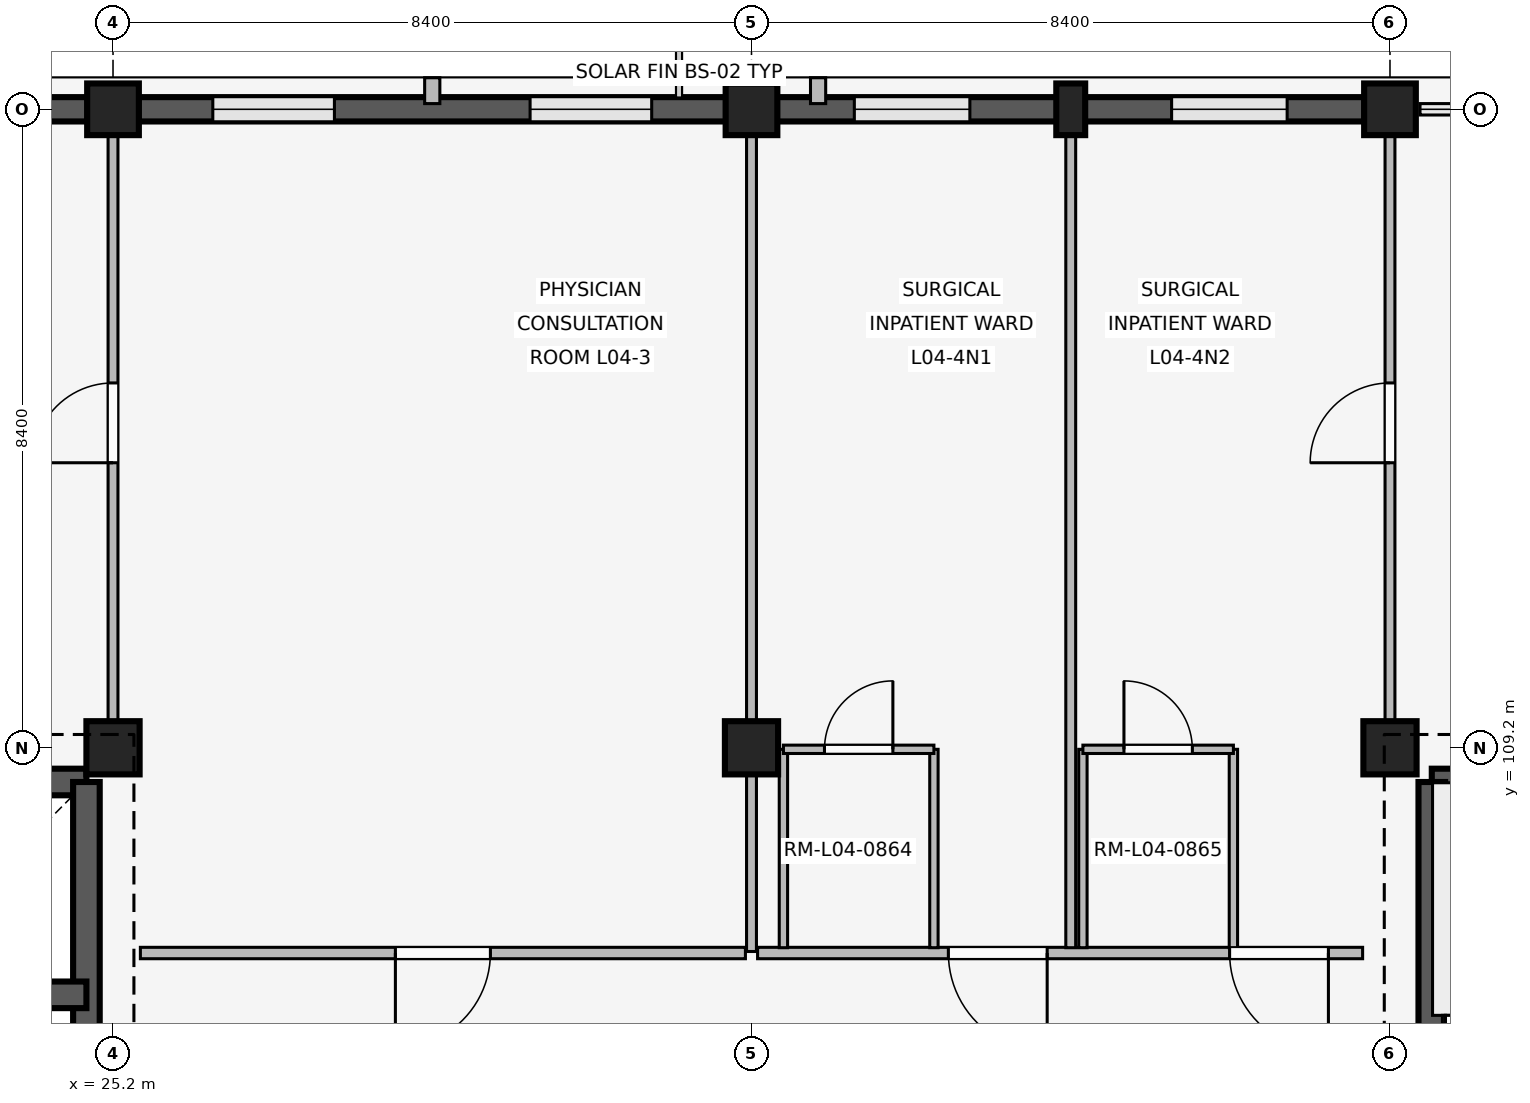
"""IFC4 building model, lengths in metres.
Left out: names, types, materials, properties, quantities, classifications, styles, units other than length and angle.
Written with IfcOpenShell. Run it as: python <this file> out.ifc"""

import sys

from ifc_helpers import new_model, si_unit, direction, frame, frame_2d, origin, origin_2d, place, context, subcontext, project, spatial, rectangle, extrude, element, fill, save


model = new_model("IFC4")
c1 = context("Model", 3, precision=1e-05, world=origin(), true_north=direction((0.0, 1.0)))
c2 = subcontext(c1, "Body", "Model", "MODEL_VIEW")
j1 = project(units=[si_unit("LENGTHUNIT", "METRE"), si_unit("PLANEANGLEUNIT", "RADIAN")], contexts=[c1])
p1 = place(None, origin())
s1 = spatial("IfcSite", under=j1, at=p1, CompositionType="ELEMENT")
p2 = place(p1, origin())
s2 = spatial("IfcBuilding", under=s1, at=p2, CompositionType="ELEMENT")
p3 = place(p2, frame((0.0, 0.0, 16.2)))
s3 = spatial("IfcBuildingStorey", under=s2, at=p3, CompositionType="ELEMENT", Elevation=16.2)
p4 = place(p3, frame((25.2, 109.2, 0.0), z_axis=(0.0, 0.0, 1.0), x_axis=(1.0, 0.0, 0.0)))
e1 = element("IfcColumn", 1, at=p4, inside=s3, PredefinedType="COLUMN", context=c2, shape_type="SweptSolid", body=[
    extrude(rectangle(XDim=0.7, YDim=0.7, at=origin_2d()), origin(), (0.0, 0.0, 1.0), 4.2),
])
p5 = place(p3, frame((25.2, 117.6, 0.0), z_axis=(0.0, 0.0, 1.0), x_axis=(1.0, 0.0, 0.0)))
e2 = element("IfcColumn", 2, at=p5, inside=s3, PredefinedType="COLUMN", context=c2, shape_type="SweptSolid", body=[
    extrude(rectangle(XDim=0.68, YDim=0.68, at=origin_2d()), origin(), (0.0, 0.0, 1.0), 4.2),
])
p6 = place(p3, frame((33.6, 109.2, 0.0), z_axis=(0.0, 0.0, 1.0), x_axis=(1.0, 0.0, 0.0)))
e3 = element("IfcColumn", 3, at=p6, inside=s3, PredefinedType="COLUMN", context=c2, shape_type="SweptSolid", body=[
    extrude(rectangle(XDim=0.7, YDim=0.7, at=origin_2d()), origin(), (0.0, 0.0, 1.0), 4.2),
])
p7 = place(p3, frame((33.6, 117.6, 0.0), z_axis=(0.0, 0.0, 1.0), x_axis=(1.0, 0.0, 0.0)))
e4 = element("IfcColumn", 4, at=p7, inside=s3, PredefinedType="COLUMN", context=c2, shape_type="SweptSolid", body=[
    extrude(rectangle(XDim=0.68, YDim=0.68, at=origin_2d()), origin(), (0.0, 0.0, 1.0), 4.2),
])
p8 = place(p3, frame((42.0, 109.2, 0.0), z_axis=(0.0, 0.0, 1.0), x_axis=(1.0, 0.0, 0.0)))
e5 = element("IfcColumn", 5, at=p8, inside=s3, PredefinedType="COLUMN", context=c2, shape_type="SweptSolid", body=[
    extrude(rectangle(XDim=0.7, YDim=0.7, at=origin_2d()), origin(), (0.0, 0.0, 1.0), 4.2),
])
p9 = place(p3, frame((42.0, 117.6, 0.0), z_axis=(0.0, 0.0, 1.0), x_axis=(1.0, 0.0, 0.0)))
e6 = element("IfcColumn", 6, at=p9, inside=s3, PredefinedType="COLUMN", context=c2, shape_type="SweptSolid", body=[
    extrude(rectangle(XDim=0.68, YDim=0.68, at=origin_2d()), origin(), (0.0, 0.0, 1.0), 4.2),
])
p10 = place(p3, frame((37.8, 117.6, 0.0), z_axis=(0.0, 0.0, 1.0), x_axis=(1.0, 0.0, 0.0)))
e7 = element("IfcColumn", 7, at=p10, inside=s3, PredefinedType="PILASTER", context=c2, shape_type="SweptSolid", body=[
    extrude(rectangle(XDim=0.38, YDim=0.68, at=origin_2d()), origin(), (0.0, 0.0, 1.0), 4.2),
])
p11 = place(p3, frame((17.135, 117.6, 0.0), z_axis=(0.0, 0.0, 1.0), x_axis=(1.0, 0.0, 0.0)))
e8 = element("IfcWall", 8, at=p11, inside=s3, PredefinedType="SOLIDWALL", context=c2, shape_type="SweptSolid", body=[
    extrude(rectangle(XDim=7.73, YDim=0.32, at=frame_2d((3.865, 0.0))), origin(), (0.0, 0.0, 1.0), 3.32),
])
p12 = place(p11, frame((0.968, 0.0, 0.85)))
e9 = element("IfcOpeningElement", 9, at=p12, cuts=e8, PredefinedType="OPENING", context=c2, shape_type="SweptSolid", body=[
    extrude(rectangle(XDim=1.62, YDim=1.52, at=frame_2d((0.81, 0.76))), frame((0.0, 0.17, 0.0), z_axis=(0.0, -1.0, 0.0), x_axis=(1.0, 0.0, 0.0)), (0.0, 0.0, 1.0), 0.34),
])
p13 = place(p11, frame((5.142, 0.0, 0.85)))
e10 = element("IfcOpeningElement", 10, at=p13, cuts=e8, PredefinedType="OPENING", context=c2, shape_type="SweptSolid", body=[
    extrude(rectangle(XDim=1.62, YDim=1.52, at=frame_2d((0.81, 0.76))), frame((0.0, 0.17, 0.0), z_axis=(0.0, -1.0, 0.0), x_axis=(1.0, 0.0, 0.0)), (0.0, 0.0, 1.0), 0.34),
])
p14 = place(p3, frame((25.535, 117.6, 0.0), z_axis=(0.0, 0.0, 1.0), x_axis=(1.0, 0.0, 0.0)))
e11 = element("IfcWall", 11, at=p14, inside=s3, PredefinedType="SOLIDWALL", context=c2, shape_type="SweptSolid", body=[
    extrude(rectangle(XDim=7.73, YDim=0.32, at=frame_2d((3.865, 0.0))), origin(), (0.0, 0.0, 1.0), 3.32),
])
p15 = place(p14, frame((0.978, 0.0, 0.85)))
e12 = element("IfcOpeningElement", 12, at=p15, cuts=e11, PredefinedType="OPENING", context=c2, shape_type="SweptSolid", body=[
    extrude(rectangle(XDim=1.6, YDim=1.65, at=frame_2d((0.8, 0.825))), frame((0.0, 0.17, 0.0), z_axis=(0.0, -1.0, 0.0), x_axis=(1.0, 0.0, 0.0)), (0.0, 0.0, 1.0), 0.34),
])
p16 = place(p14, frame((5.152, 0.0, 0.85)))
e13 = element("IfcOpeningElement", 13, at=p16, cuts=e11, PredefinedType="OPENING", context=c2, shape_type="SweptSolid", body=[
    extrude(rectangle(XDim=1.6, YDim=1.65, at=frame_2d((0.8, 0.825))), frame((0.0, 0.17, 0.0), z_axis=(0.0, -1.0, 0.0), x_axis=(1.0, 0.0, 0.0)), (0.0, 0.0, 1.0), 0.34),
])
p17 = place(p3, frame((29.4, 117.675, 0.0), z_axis=(0.0, 0.0, 1.0), x_axis=(0.0, 1.0, 0.0)))
e14 = element("IfcWall", 14, at=p17, inside=s3, PredefinedType="ELEMENTEDWALL", context=c2, shape_type="SweptSolid", body=[
    extrude(rectangle(XDim=0.34, YDim=0.2, at=frame_2d((0.17, 0.0))), origin(), (0.0, 0.0, 1.0), 3.3),
])
p18 = place(p3, frame((33.935, 117.6, 0.0), z_axis=(0.0, 0.0, 1.0), x_axis=(1.0, 0.0, 0.0)))
e15 = element("IfcWall", 15, at=p18, inside=s3, PredefinedType="SOLIDWALL", context=c2, shape_type="SweptSolid", body=[
    extrude(rectangle(XDim=7.73, YDim=0.32, at=frame_2d((3.865, 0.0))), origin(), (0.0, 0.0, 1.0), 3.32),
])
p19 = place(p18, frame((1.018, 0.0, 0.85)))
e16 = element("IfcOpeningElement", 16, at=p19, cuts=e15, PredefinedType="OPENING", context=c2, shape_type="SweptSolid", body=[
    extrude(rectangle(XDim=1.52, YDim=1.65, at=frame_2d((0.76, 0.825))), frame((0.0, 0.17, 0.0), z_axis=(0.0, -1.0, 0.0), x_axis=(1.0, 0.0, 0.0)), (0.0, 0.0, 1.0), 0.34),
])
p20 = place(p18, frame((5.192, 0.0, 0.85)))
e17 = element("IfcOpeningElement", 17, at=p20, cuts=e15, PredefinedType="OPENING", context=c2, shape_type="SweptSolid", body=[
    extrude(rectangle(XDim=1.52, YDim=1.65, at=frame_2d((0.76, 0.825))), frame((0.0, 0.17, 0.0), z_axis=(0.0, -1.0, 0.0), x_axis=(1.0, 0.0, 0.0)), (0.0, 0.0, 1.0), 0.34),
])
p21 = place(p3, frame((34.476, 117.675, 0.0), z_axis=(0.0, 0.0, 1.0), x_axis=(0.0, 1.0, 0.0)))
e18 = element("IfcWall", 18, at=p21, inside=s3, PredefinedType="ELEMENTEDWALL", context=c2, shape_type="SweptSolid", body=[
    extrude(rectangle(XDim=0.34, YDim=0.2, at=frame_2d((0.17, 0.0))), origin(), (0.0, 0.0, 1.0), 3.3),
])
p22 = place(p3, frame((42.55, 108.75, 0.0), z_axis=(0.0, 0.0, 1.0), x_axis=(1.0, 0.0, 0.0)))
e19 = element("IfcWall", 19, at=p22, inside=s3, PredefinedType="SHEAR", context=c2, shape_type="SweptSolid", body=[
    extrude(rectangle(XDim=7.5, YDim=0.35, at=frame_2d((3.75, 0.0))), origin(), (0.0, 0.0, 1.0), 3.92),
])
p23 = place(p3, frame((42.55, 101.2, 0.0), z_axis=(0.0, 0.0, 1.0), x_axis=(0.0, 1.0, 0.0)))
e20 = element("IfcWall", 20, at=p23, inside=s3, PredefinedType="SHEAR", context=c2, shape_type="SweptSolid", body=[
    extrude(rectangle(XDim=7.55, YDim=0.35, at=frame_2d((3.775, 0.0))), origin(), (0.0, 0.0, 1.0), 3.92),
])
p24 = place(p23, frame((0.28, 0.0, 0.0)))
e21 = element("IfcOpeningElement", 21, at=p24, cuts=e20, PredefinedType="OPENING", context=c2, shape_type="SweptSolid", body=[
    extrude(rectangle(XDim=1.0, YDim=2.15, at=frame_2d((0.5, 1.075))), frame((0.0, 0.185, 0.0), z_axis=(0.0, -1.0, 0.0), x_axis=(1.0, 0.0, 0.0)), (0.0, 0.0, 1.0), 0.37),
])
p25 = place(p3, frame((17.35, 108.75, 0.0), z_axis=(0.0, 0.0, 1.0), x_axis=(1.0, 0.0, 0.0)))
e22 = element("IfcWall", 22, at=p25, inside=s3, PredefinedType="SHEAR", context=c2, shape_type="SweptSolid", body=[
    extrude(rectangle(XDim=7.5, YDim=0.35, at=frame_2d((3.75, 0.0))), origin(), (0.0, 0.0, 1.0), 3.92),
])
p26 = place(p3, frame((24.85, 101.2, 0.0), z_axis=(0.0, 0.0, 1.0), x_axis=(0.0, 1.0, 0.0)))
e23 = element("IfcWall", 23, at=p26, inside=s3, PredefinedType="SHEAR", context=c2, shape_type="SweptSolid", body=[
    extrude(rectangle(XDim=7.55, YDim=0.35, at=frame_2d((3.775, 0.0))), origin(), (0.0, 0.0, 1.0), 3.92),
])
p27 = place(p26, frame((2.4, 0.0, 0.0)))
e24 = element("IfcOpeningElement", 24, at=p27, cuts=e23, PredefinedType="OPENING", context=c2, shape_type="SweptSolid", body=[
    extrude(rectangle(XDim=1.2, YDim=2.2, at=frame_2d((0.6, 1.1))), frame((0.0, 0.185, 0.0), z_axis=(0.0, -1.0, 0.0), x_axis=(1.0, 0.0, 0.0)), (0.0, 0.0, 1.0), 0.37),
])
p28 = place(p3, frame((21.05, 105.95, 0.0), z_axis=(0.0, 0.0, 1.0), x_axis=(1.0, 0.0, 0.0)))
e25 = element("IfcWall", 25, at=p28, inside=s3, PredefinedType="SHEAR", context=c2, shape_type="SweptSolid", body=[
    extrude(rectangle(XDim=3.8, YDim=0.35, at=frame_2d((1.9, 0.0))), origin(), (0.0, 0.0, 1.0), 3.92),
])
p29 = place(p28, frame((0.32, 0.0, 0.0)))
e26 = element("IfcOpeningElement", 26, at=p29, cuts=e25, PredefinedType="OPENING", context=c2, shape_type="SweptSolid", body=[
    extrude(rectangle(XDim=1.1, YDim=2.15, at=frame_2d((0.55, 1.075))), frame((0.0, 0.185, 0.0), z_axis=(0.0, -1.0, 0.0), x_axis=(1.0, 0.0, 0.0)), (0.0, 0.0, 1.0), 0.37),
])
p30 = place(p3, frame((25.2, 109.55, 0.0), z_axis=(0.0, 0.0, 1.0), x_axis=(0.0, 1.0, 0.0)))
e27 = element("IfcWall", 27, at=p30, inside=s3, PredefinedType="PARTITIONING", context=c2, shape_type="SweptSolid", body=[
    extrude(rectangle(XDim=7.91, YDim=0.13, at=frame_2d((3.955, 0.0))), origin(), (0.0, 0.0, 1.0), 3.3),
])
p31 = place(p30, frame((3.4, 0.0, 0.0)))
e28 = element("IfcOpeningElement", 28, at=p31, cuts=e27, PredefinedType="OPENING", context=c2, shape_type="SweptSolid", body=[
    extrude(rectangle(XDim=1.05, YDim=2.2, at=frame_2d((0.525, 1.1))), frame((0.0, 0.075, 0.0), z_axis=(0.0, -1.0, 0.0), x_axis=(1.0, 0.0, 0.0)), (0.0, 0.0, 1.0), 0.15),
])
p32 = place(p3, frame((33.52, 106.5, 0.0), z_axis=(0.0, 0.0, 1.0), x_axis=(-1.0, 0.0, 0.0)))
e29 = element("IfcWall", 29, at=p32, inside=s3, PredefinedType="PARTITIONING", context=c2, shape_type="SweptSolid", body=[
    extrude(rectangle(XDim=7.96, YDim=0.15, at=frame_2d((3.98, 0.0))), origin(), (0.0, 0.0, 1.0), 3.3),
])
p33 = place(p32, frame((3.355, 0.0, 0.0)))
e30 = element("IfcOpeningElement", 30, at=p33, cuts=e29, PredefinedType="OPENING", context=c2, shape_type="SweptSolid", body=[
    extrude(rectangle(XDim=1.25, YDim=2.2, at=frame_2d((0.625, 1.1))), frame((0.0, 0.085, 0.0), z_axis=(0.0, -1.0, 0.0), x_axis=(1.0, 0.0, 0.0)), (0.0, 0.0, 1.0), 0.17),
])
p34 = place(p3, frame((33.6, 106.52, 0.0), z_axis=(0.0, 0.0, 1.0), x_axis=(0.0, 1.0, 0.0)))
e31 = element("IfcWall", 31, at=p34, inside=s3, PredefinedType="PARTITIONING", context=c2, shape_type="SweptSolid", body=[
    extrude(rectangle(XDim=10.94, YDim=0.13, at=frame_2d((5.47, 0.0))), origin(), (0.0, 0.0, 1.0), 3.3),
])
p35 = place(p3, frame((41.64, 106.5, 0.0), z_axis=(0.0, 0.0, 1.0), x_axis=(-1.0, 0.0, 0.0)))
e32 = element("IfcWall", 32, at=p35, inside=s3, PredefinedType="PARTITIONING", context=c2, shape_type="SweptSolid", body=[
    extrude(rectangle(XDim=7.96, YDim=0.15, at=frame_2d((3.98, 0.0))), origin(), (0.0, 0.0, 1.0), 3.3),
])
p36 = place(p35, frame((0.45, 0.0, 0.0)))
e33 = element("IfcOpeningElement", 33, at=p36, cuts=e32, PredefinedType="OPENING", context=c2, shape_type="SweptSolid", body=[
    extrude(rectangle(XDim=1.3, YDim=2.25, at=frame_2d((0.65, 1.125))), frame((0.0, 0.085, 0.0), z_axis=(0.0, -1.0, 0.0), x_axis=(1.0, 0.0, 0.0)), (0.0, 0.0, 1.0), 0.17),
])
p37 = place(p35, frame((4.15, 0.0, 0.0)))
e34 = element("IfcOpeningElement", 34, at=p37, cuts=e32, PredefinedType="OPENING", context=c2, shape_type="SweptSolid", body=[
    extrude(rectangle(XDim=1.3, YDim=2.25, at=frame_2d((0.65, 1.125))), frame((0.0, 0.085, 0.0), z_axis=(0.0, -1.0, 0.0), x_axis=(1.0, 0.0, 0.0)), (0.0, 0.0, 1.0), 0.17),
])
p38 = place(p3, frame((37.8, 106.57, 0.0), z_axis=(0.0, 0.0, 1.0), x_axis=(0.0, 1.0, 0.0)))
e35 = element("IfcWall", 35, at=p38, inside=s3, PredefinedType="PARTITIONING", context=c2, shape_type="SweptSolid", body=[
    extrude(rectangle(XDim=10.93, YDim=0.13, at=frame_2d((5.465, 0.0))), origin(), (0.0, 0.0, 1.0), 3.3),
])
for number, where, z_axis, x_axis in (
    (36, (34.02, 106.57, 0.0), (0.0, 0.0, 1.0), (0.0, 1.0, 0.0)),
    (37, (36.0, 106.57, 0.0), (0.0, 0.0, 1.0), (0.0, 1.0, 0.0)),
):
    element("IfcWall", number, at=place(p3, frame(where, z_axis=z_axis, x_axis=x_axis)), inside=s3, PredefinedType="PARTITIONING", context=c2, shape_type="SweptSolid", body=[
        extrude(rectangle(XDim=2.61, YDim=0.11, at=frame_2d((1.305, 0.0))), origin(), (0.0, 0.0, 1.0), 3.3),
    ])
p39 = place(p3, frame((34.02, 109.18, 0.0), z_axis=(0.0, 0.0, 1.0), x_axis=(1.0, 0.0, 0.0)))
e38 = element("IfcWall", 38, at=p39, inside=s3, PredefinedType="PARTITIONING", context=c2, shape_type="SweptSolid", body=[
    extrude(rectangle(XDim=1.98, YDim=0.11, at=frame_2d((0.99, 0.0))), origin(), (0.0, 0.0, 1.0), 3.3),
])
p40 = place(p39, frame((0.54, 0.0, 0.0)))
e39 = element("IfcOpeningElement", 39, at=p40, cuts=e38, PredefinedType="OPENING", context=c2, shape_type="SweptSolid", body=[
    extrude(rectangle(XDim=0.9, YDim=2.1, at=frame_2d((0.45, 1.05))), frame((0.0, 0.065, 0.0), z_axis=(0.0, -1.0, 0.0), x_axis=(1.0, 0.0, 0.0)), (0.0, 0.0, 1.0), 0.13),
])
for number, where, z_axis, x_axis in (
    (40, (37.96, 106.57, 0.0), (0.0, 0.0, 1.0), (0.0, 1.0, 0.0)),
    (41, (39.94, 106.57, 0.0), (0.0, 0.0, 1.0), (0.0, 1.0, 0.0)),
):
    element("IfcWall", number, at=place(p3, frame(where, z_axis=z_axis, x_axis=x_axis)), inside=s3, PredefinedType="PARTITIONING", context=c2, shape_type="SweptSolid", body=[
        extrude(rectangle(XDim=2.61, YDim=0.11, at=frame_2d((1.305, 0.0))), origin(), (0.0, 0.0, 1.0), 3.3),
    ])
p41 = place(p3, frame((37.96, 109.18, 0.0), z_axis=(0.0, 0.0, 1.0), x_axis=(1.0, 0.0, 0.0)))
e42 = element("IfcWall", 42, at=p41, inside=s3, PredefinedType="PARTITIONING", context=c2, shape_type="SweptSolid", body=[
    extrude(rectangle(XDim=1.98, YDim=0.11, at=frame_2d((0.99, 0.0))), origin(), (0.0, 0.0, 1.0), 3.3),
])
p42 = place(p41, frame((0.54, 0.0, 0.0)))
e43 = element("IfcOpeningElement", 43, at=p42, cuts=e42, PredefinedType="OPENING", context=c2, shape_type="SweptSolid", body=[
    extrude(rectangle(XDim=0.9, YDim=2.1, at=frame_2d((0.45, 1.05))), frame((0.0, 0.065, 0.0), z_axis=(0.0, -1.0, 0.0), x_axis=(1.0, 0.0, 0.0)), (0.0, 0.0, 1.0), 0.13),
])
p43 = place(p3, frame((42.0, 109.55, 0.0), z_axis=(0.0, 0.0, 1.0), x_axis=(0.0, 1.0, 0.0)))
e44 = element("IfcWall", 44, at=p43, inside=s3, PredefinedType="PARTITIONING", context=c2, shape_type="SweptSolid", body=[
    extrude(rectangle(XDim=7.91, YDim=0.13, at=frame_2d((3.955, 0.0))), origin(), (0.0, 0.0, 1.0), 3.3),
])
p44 = place(p43, frame((3.4, 0.0, 0.0)))
e45 = element("IfcOpeningElement", 45, at=p44, cuts=e44, PredefinedType="OPENING", context=c2, shape_type="SweptSolid", body=[
    extrude(rectangle(XDim=1.05, YDim=2.2, at=frame_2d((0.525, 1.1))), frame((0.0, 0.075, 0.0), z_axis=(0.0, -1.0, 0.0), x_axis=(1.0, 0.0, 0.0)), (0.0, 0.0, 1.0), 0.15),
])
p45 = place(p15, origin())
e46 = element("IfcWindow", 46, at=p45, inside=s3, PartitioningType="SINGLE_PANEL", PredefinedType="WINDOW", context=c2, shape_type="SweptSolid", body=[
    extrude(rectangle(XDim=1.6, YDim=1.65, at=frame_2d((0.8, 0.825))), frame((0.0, 0.03, 0.0), z_axis=(0.0, -1.0, 0.0), x_axis=(1.0, 0.0, 0.0)), (0.0, 0.0, 1.0), 0.06),
])
fill(e12, e46)
p46 = place(p16, origin())
e47 = element("IfcWindow", 47, at=p46, inside=s3, PartitioningType="SINGLE_PANEL", PredefinedType="WINDOW", context=c2, shape_type="SweptSolid", body=[
    extrude(rectangle(XDim=1.6, YDim=1.65, at=frame_2d((0.8, 0.825))), frame((0.0, 0.03, 0.0), z_axis=(0.0, -1.0, 0.0), x_axis=(1.0, 0.0, 0.0)), (0.0, 0.0, 1.0), 0.06),
])
fill(e13, e47)
p47 = place(p19, origin())
e48 = element("IfcWindow", 48, at=p47, inside=s3, PartitioningType="SINGLE_PANEL", PredefinedType="WINDOW", context=c2, shape_type="SweptSolid", body=[
    extrude(rectangle(XDim=1.52, YDim=1.65, at=frame_2d((0.76, 0.825))), frame((0.0, 0.03, 0.0), z_axis=(0.0, -1.0, 0.0), x_axis=(1.0, 0.0, 0.0)), (0.0, 0.0, 1.0), 0.06),
])
fill(e16, e48)
p48 = place(p20, origin())
e49 = element("IfcWindow", 49, at=p48, inside=s3, PartitioningType="SINGLE_PANEL", PredefinedType="WINDOW", context=c2, shape_type="SweptSolid", body=[
    extrude(rectangle(XDim=1.52, YDim=1.65, at=frame_2d((0.76, 0.825))), frame((0.0, 0.03, 0.0), z_axis=(0.0, -1.0, 0.0), x_axis=(1.0, 0.0, 0.0)), (0.0, 0.0, 1.0), 0.06),
])
fill(e17, e49)
p49 = place(p31, origin())
e50 = element("IfcDoor", 50, at=p49, inside=s3, OperationType="SINGLE_SWING_LEFT", PredefinedType="DOOR", context=c2, shape_type="SweptSolid", body=[
    extrude(rectangle(XDim=1.05, YDim=2.2, at=frame_2d((0.525, 1.1))), frame((0.0, 0.025, 0.0), z_axis=(0.0, -1.0, 0.0), x_axis=(1.0, 0.0, 0.0)), (0.0, 0.0, 1.0), 0.05),
])
fill(e28, e50)
p50 = place(p33, origin())
e51 = element("IfcDoor", 51, at=p50, inside=s3, OperationType="SINGLE_SWING_RIGHT", PredefinedType="DOOR", context=c2, shape_type="SweptSolid", body=[
    extrude(rectangle(XDim=1.25, YDim=2.2, at=frame_2d((0.625, 1.1))), frame((0.0, 0.025, 0.0), z_axis=(0.0, -1.0, 0.0), x_axis=(1.0, 0.0, 0.0)), (0.0, 0.0, 1.0), 0.05),
])
fill(e30, e51)
p51 = place(p36, origin())
e52 = element("IfcDoor", 52, at=p51, inside=s3, OperationType="SINGLE_SWING_LEFT", PredefinedType="DOOR", context=c2, shape_type="SweptSolid", body=[
    extrude(rectangle(XDim=1.3, YDim=2.25, at=frame_2d((0.65, 1.125))), frame((0.0, 0.025, 0.0), z_axis=(0.0, -1.0, 0.0), x_axis=(1.0, 0.0, 0.0)), (0.0, 0.0, 1.0), 0.05),
])
fill(e33, e52)
p52 = place(p37, origin())
e53 = element("IfcDoor", 53, at=p52, inside=s3, OperationType="SINGLE_SWING_LEFT", PredefinedType="DOOR", context=c2, shape_type="SweptSolid", body=[
    extrude(rectangle(XDim=1.3, YDim=2.25, at=frame_2d((0.65, 1.125))), frame((0.0, 0.025, 0.0), z_axis=(0.0, -1.0, 0.0), x_axis=(1.0, 0.0, 0.0)), (0.0, 0.0, 1.0), 0.05),
])
fill(e34, e53)
p53 = place(p40, origin())
e54 = element("IfcDoor", 54, at=p53, inside=s3, OperationType="SINGLE_SWING_RIGHT", PredefinedType="DOOR", context=c2, shape_type="SweptSolid", body=[
    extrude(rectangle(XDim=0.9, YDim=2.1, at=frame_2d((0.45, 1.05))), frame((0.0, 0.025, 0.0), z_axis=(0.0, -1.0, 0.0), x_axis=(1.0, 0.0, 0.0)), (0.0, 0.0, 1.0), 0.05),
])
fill(e39, e54)
p54 = place(p42, origin())
e55 = element("IfcDoor", 55, at=p54, inside=s3, OperationType="SINGLE_SWING_LEFT", PredefinedType="DOOR", context=c2, shape_type="SweptSolid", body=[
    extrude(rectangle(XDim=0.9, YDim=2.1, at=frame_2d((0.45, 1.05))), frame((0.0, 0.025, 0.0), z_axis=(0.0, -1.0, 0.0), x_axis=(1.0, 0.0, 0.0)), (0.0, 0.0, 1.0), 0.05),
])
fill(e43, e55)
p55 = place(p44, origin())
e56 = element("IfcDoor", 56, at=p55, inside=s3, OperationType="SINGLE_SWING_LEFT", PredefinedType="DOOR", context=c2, shape_type="SweptSolid", body=[
    extrude(rectangle(XDim=1.05, YDim=2.2, at=frame_2d((0.525, 1.1))), frame((0.0, 0.025, 0.0), z_axis=(0.0, -1.0, 0.0), x_axis=(1.0, 0.0, 0.0)), (0.0, 0.0, 1.0), 0.05),
])
fill(e45, e56)
save(model, sys.argv[1])
